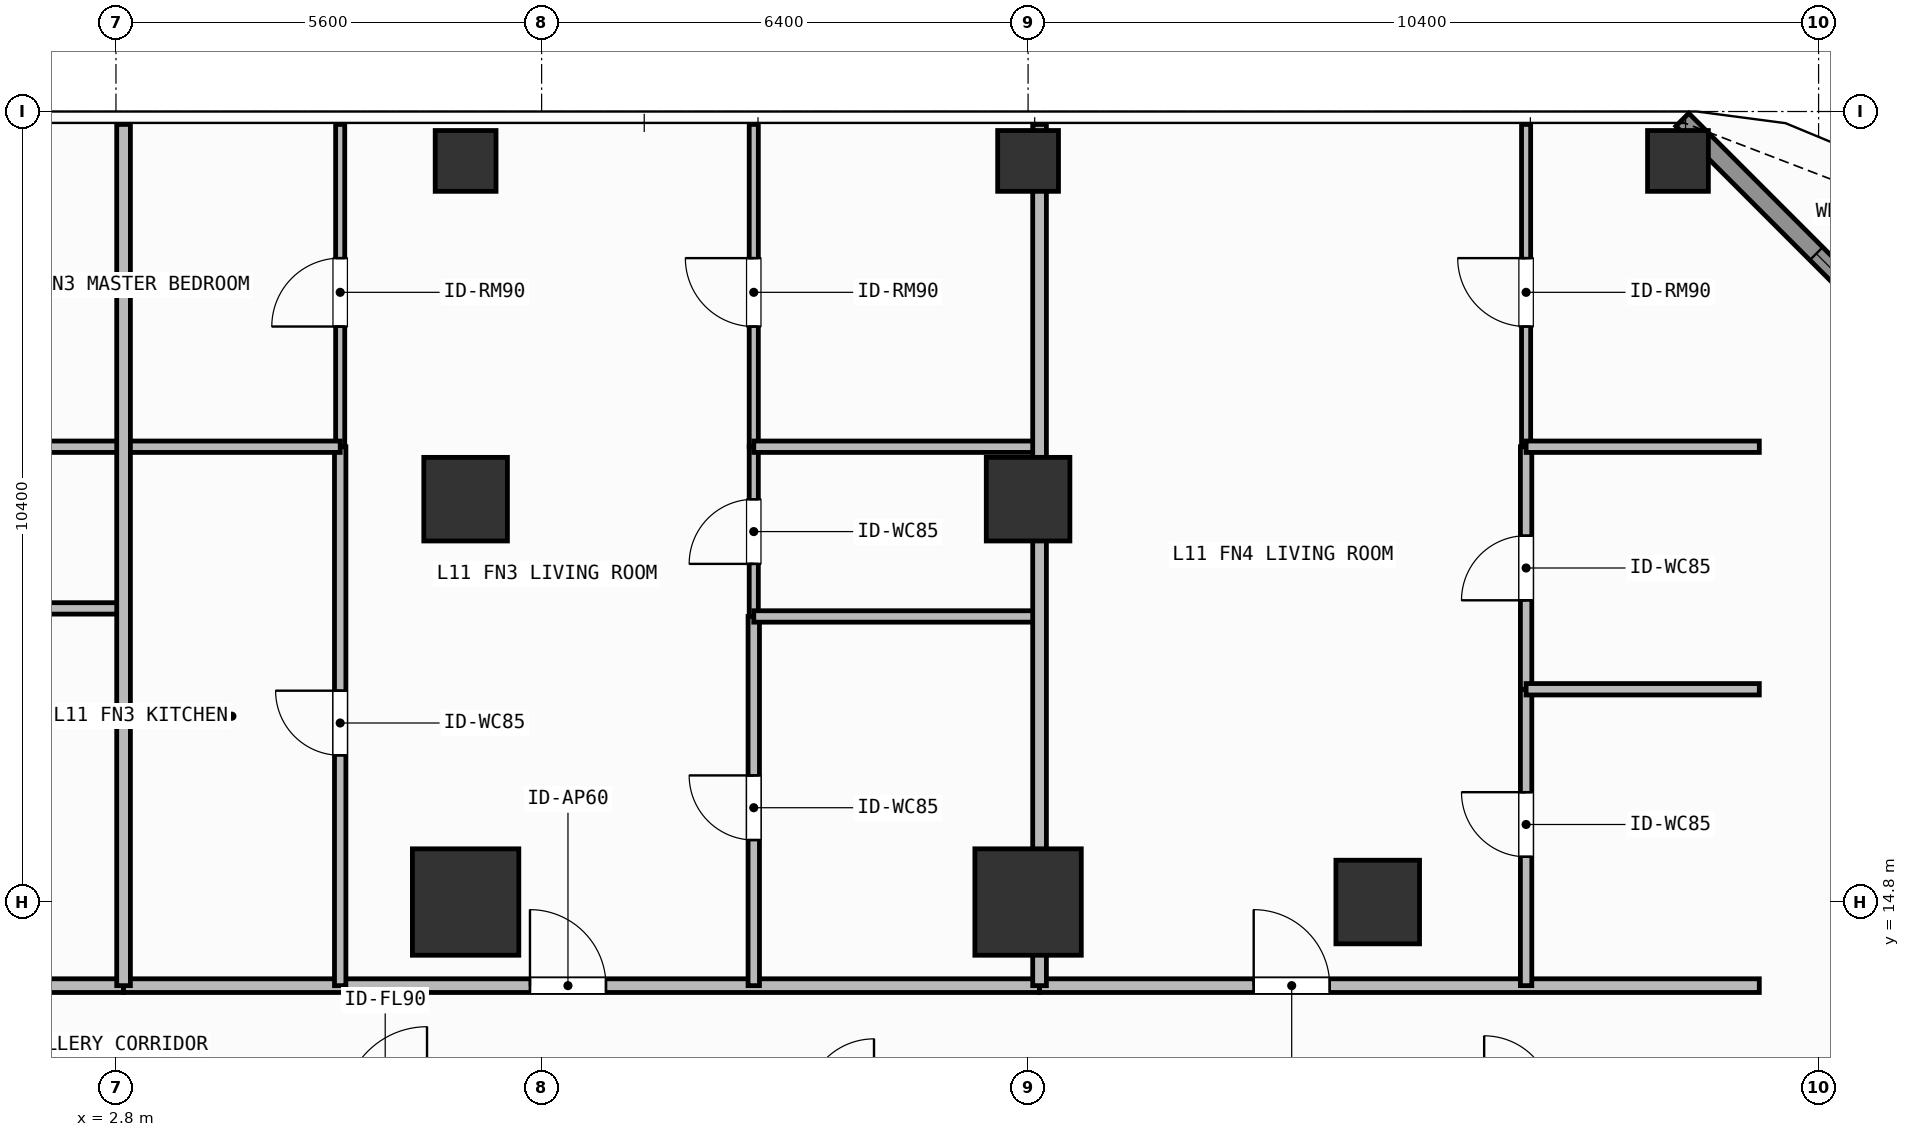
"""IFC4 building model, lengths in metres.
Left out: names, types, materials, properties, quantities, classifications, styles, units other than length and angle.
Written with IfcOpenShell. Run it as: python <this file> out.ifc"""

import sys

from ifc_helpers import new_model, si_unit, direction, frame, frame_2d, origin, origin_2d, place, context, subcontext, project, spatial, rectangle, hollow_rectangle, extrude, element, fill, save


model = new_model("IFC4")
c1 = context("Model", 3, precision=1e-05, world=origin(), true_north=direction((0.0, 1.0)))
c2 = subcontext(c1, "Body", "Model", "MODEL_VIEW")
j1 = project(units=[si_unit("LENGTHUNIT", "METRE"), si_unit("PLANEANGLEUNIT", "RADIAN")], contexts=[c1])
p1 = place(None, origin())
s1 = spatial("IfcSite", under=j1, at=p1, CompositionType="ELEMENT")
p2 = place(p1, origin())
s2 = spatial("IfcBuilding", under=s1, at=p2, CompositionType="ELEMENT")
p3 = place(p2, frame((0.0, 0.0, 42.3)))
s3 = spatial("IfcBuildingStorey", under=s2, at=p3, CompositionType="ELEMENT", Elevation=42.3)
for number, where, z_axis, x_axis in (
    (1, (7.4, 14.8, 0.0), (0.0, 0.0, 1.0), (1.0, 0.0, 0.0)),
    (2, (14.8, 14.8, 0.0), (0.0, 0.0, 1.0), (1.0, 0.0, 0.0)),
):
    element("IfcColumn", number, at=place(p3, frame(where, z_axis=z_axis, x_axis=x_axis)), inside=s3, PredefinedType="COLUMN", context=c2, shape_type="SweptSolid", body=[
        extrude(rectangle(XDim=1.4, YDim=1.4, at=origin_2d()), origin(), (0.0, 0.0, 1.0), 3.9),
    ])
for number, where, z_axis, x_axis in (
    (3, (19.4, 14.8, 0.0), (0.0, 0.0, 1.0), (1.0, 0.0, 0.0)),
    (4, (7.4, 20.1, 0.0), (0.0, 0.0, 1.0), (1.0, 0.0, 0.0)),
    (5, (14.8, 20.1, 0.0), (0.0, 0.0, 1.0), (1.0, 0.0, 0.0)),
):
    element("IfcColumn", number, at=place(p3, frame(where, z_axis=z_axis, x_axis=x_axis)), inside=s3, PredefinedType="COLUMN", context=c2, shape_type="SweptSolid", body=[
        extrude(rectangle(XDim=1.1, YDim=1.1, at=origin_2d()), origin(), (0.0, 0.0, 1.0), 3.9),
    ])
for number, where, z_axis, x_axis in (
    (6, (23.35, 24.55, 0.0), (0.0, 0.0, 1.0), (1.0, 0.0, 0.0)),
    (7, (7.4, 24.55, 0.0), (0.0, 0.0, 1.0), (1.0, 0.0, 0.0)),
    (8, (14.8, 24.55, 0.0), (0.0, 0.0, 1.0), (1.0, 0.0, 0.0)),
):
    element("IfcColumn", number, at=place(p3, frame(where, z_axis=z_axis, x_axis=x_axis)), inside=s3, PredefinedType="COLUMN", context=c2, shape_type="SweptSolid", body=[
        extrude(hollow_rectangle(XDim=0.8, YDim=0.8, WallThickness=0.036, at=origin_2d()), origin(), (0.0, 0.0, 1.0), 3.9),
    ])
p4 = place(p3, frame((23.408, 25.092, 0.0), z_axis=(0.0, 0.0, 1.0), x_axis=(0.707106781187, -0.707106781187, 0.0)))
e9 = element("IfcWall", 9, at=p4, inside=s3, PredefinedType="SOLIDWALL", context=c2, shape_type="SweptSolid", body=[
    extrude(rectangle(XDim=6.484, YDim=0.24, at=frame_2d((3.242, 0.0))), origin(), (0.0, 0.0, 1.0), 3.68),
])
p5 = place(p4, frame((2.492, 0.0, 0.8)))
e10 = element("IfcOpeningElement", 10, at=p5, cuts=e9, PredefinedType="OPENING", context=c2, shape_type="SweptSolid", body=[
    extrude(rectangle(XDim=1.5, YDim=1.85, at=frame_2d((0.75, 0.925))), frame((0.0, 0.13, 0.0), z_axis=(0.0, -1.0, 0.0), x_axis=(1.0, 0.0, 0.0)), (0.0, 0.0, 1.0), 0.26),
])
p6 = place(p3, frame((-9.151, 13.7, 0.0), z_axis=(0.0, 0.0, 1.0), x_axis=(1.0, 0.0, 0.0)))
e11 = element("IfcWall", 11, at=p6, inside=s3, PredefinedType="PARTITIONING", context=c2, shape_type="SweptSolid", body=[
    extrude(rectangle(XDim=12.051, YDim=0.18, at=frame_2d((6.025, 0.0))), origin(), (0.0, 0.0, 1.0), 3.68),
])
p7 = place(p6, frame((4.989, 0.0, 0.0)))
e12 = element("IfcOpeningElement", 12, at=p7, cuts=e11, PredefinedType="OPENING", context=c2, shape_type="SweptSolid", body=[
    extrude(rectangle(XDim=1.0, YDim=2.2, at=frame_2d((0.5, 1.1))), frame((0.0, 0.1, 0.0), z_axis=(0.0, -1.0, 0.0), x_axis=(1.0, 0.0, 0.0)), (0.0, 0.0, 1.0), 0.2),
])
p8 = place(p3, frame((2.9, 13.7, 0.0), z_axis=(0.0, 0.0, 1.0), x_axis=(1.0, 0.0, 0.0)))
e13 = element("IfcWall", 13, at=p8, inside=s3, PredefinedType="PARTITIONING", context=c2, shape_type="SweptSolid", body=[
    extrude(rectangle(XDim=12.051, YDim=0.18, at=frame_2d((6.025, 0.0))), origin(), (0.0, 0.0, 1.0), 3.68),
])
p9 = place(p8, frame((5.347, 0.0, 0.0)))
e14 = element("IfcOpeningElement", 14, at=p9, cuts=e13, PredefinedType="OPENING", context=c2, shape_type="SweptSolid", body=[
    extrude(rectangle(XDim=1.0, YDim=2.2, at=frame_2d((0.5, 1.1))), frame((0.0, 0.1, 0.0), z_axis=(0.0, -1.0, 0.0), x_axis=(1.0, 0.0, 0.0)), (0.0, 0.0, 1.0), 0.2),
])
p10 = place(p3, frame((5.75, 13.7, 0.0), z_axis=(0.0, 0.0, 1.0), x_axis=(0.0, 1.0, 0.0)))
e15 = element("IfcWall", 15, at=p10, inside=s3, PredefinedType="PARTITIONING", context=c2, shape_type="SweptSolid", body=[
    extrude(rectangle(XDim=7.09, YDim=0.15, at=frame_2d((3.545, 0.0))), origin(), (0.0, 0.0, 1.0), 3.68),
])
p11 = place(p10, frame((3.03, 0.0, 0.0)))
e16 = element("IfcOpeningElement", 16, at=p11, cuts=e15, PredefinedType="OPENING", context=c2, shape_type="SweptSolid", body=[
    extrude(rectangle(XDim=0.85, YDim=2.1, at=frame_2d((0.425, 1.05))), frame((0.0, 0.085, 0.0), z_axis=(0.0, -1.0, 0.0), x_axis=(1.0, 0.0, 0.0)), (0.0, 0.0, 1.0), 0.17),
])
p12 = place(p3, frame((5.75, 20.79, 0.0), z_axis=(0.0, 0.0, 1.0), x_axis=(0.0, 1.0, 0.0)))
e17 = element("IfcWall", 17, at=p12, inside=s3, PredefinedType="PARTITIONING", context=c2, shape_type="SweptSolid", body=[
    extrude(rectangle(XDim=4.24, YDim=0.12, at=frame_2d((2.12, 0.0))), origin(), (0.0, 0.0, 1.0), 3.68),
])
p13 = place(p12, frame((1.581, 0.0, 0.0)))
e18 = element("IfcOpeningElement", 18, at=p13, cuts=e17, PredefinedType="OPENING", context=c2, shape_type="SweptSolid", body=[
    extrude(rectangle(XDim=0.9, YDim=2.1, at=frame_2d((0.45, 1.05))), frame((0.0, 0.07, 0.0), z_axis=(0.0, -1.0, 0.0), x_axis=(1.0, 0.0, 0.0)), (0.0, 0.0, 1.0), 0.14),
])
p14 = place(p3, frame((11.191, 13.7, 0.0), z_axis=(0.0, 0.0, 1.0), x_axis=(0.0, 1.0, 0.0)))
e19 = element("IfcWall", 19, at=p14, inside=s3, PredefinedType="PARTITIONING", context=c2, shape_type="SweptSolid", body=[
    extrude(rectangle(XDim=4.857, YDim=0.15, at=frame_2d((2.428, 0.0))), origin(), (0.0, 0.0, 1.0), 3.68),
])
p15 = place(p14, frame((1.916, 0.0, 0.0)))
e20 = element("IfcOpeningElement", 20, at=p15, cuts=e19, PredefinedType="OPENING", context=c2, shape_type="SweptSolid", body=[
    extrude(rectangle(XDim=0.85, YDim=2.1, at=frame_2d((0.425, 1.05))), frame((0.0, 0.085, 0.0), z_axis=(0.0, -1.0, 0.0), x_axis=(1.0, 0.0, 0.0)), (0.0, 0.0, 1.0), 0.17),
])
p16 = place(p3, frame((11.191, 18.557, 0.0), z_axis=(0.0, 0.0, 1.0), x_axis=(0.0, 1.0, 0.0)))
e21 = element("IfcWall", 21, at=p16, inside=s3, PredefinedType="PARTITIONING", context=c2, shape_type="SweptSolid", body=[
    extrude(rectangle(XDim=2.233, YDim=0.12, at=frame_2d((1.117, 0.0))), origin(), (0.0, 0.0, 1.0), 3.37),
])
p17 = place(p16, frame((0.691, 0.0, 0.0)))
e22 = element("IfcOpeningElement", 22, at=p17, cuts=e21, PredefinedType="OPENING", context=c2, shape_type="SweptSolid", body=[
    extrude(rectangle(XDim=0.85, YDim=2.1, at=frame_2d((0.425, 1.05))), frame((0.0, 0.07, 0.0), z_axis=(0.0, -1.0, 0.0), x_axis=(1.0, 0.0, 0.0)), (0.0, 0.0, 1.0), 0.14),
])
p18 = place(p3, frame((11.191, 20.79, 0.0), z_axis=(0.0, 0.0, 1.0), x_axis=(0.0, 1.0, 0.0)))
e23 = element("IfcWall", 23, at=p18, inside=s3, PredefinedType="PARTITIONING", context=c2, shape_type="SweptSolid", body=[
    extrude(rectangle(XDim=4.24, YDim=0.12, at=frame_2d((2.12, 0.0))), origin(), (0.0, 0.0, 1.0), 3.37),
])
p19 = place(p18, frame((1.581, 0.0, 0.0)))
e24 = element("IfcOpeningElement", 24, at=p19, cuts=e23, PredefinedType="OPENING", context=c2, shape_type="SweptSolid", body=[
    extrude(rectangle(XDim=0.9, YDim=2.1, at=frame_2d((0.45, 1.05))), frame((0.0, 0.07, 0.0), z_axis=(0.0, -1.0, 0.0), x_axis=(1.0, 0.0, 0.0)), (0.0, 0.0, 1.0), 0.14),
])
p20 = place(p3, frame((14.951, 13.7, 0.0), z_axis=(0.0, 0.0, 1.0), x_axis=(1.0, 0.0, 0.0)))
e25 = element("IfcWall", 25, at=p20, inside=s3, PredefinedType="PARTITIONING", context=c2, shape_type="SweptSolid", body=[
    extrude(rectangle(XDim=9.469, YDim=0.18, at=frame_2d((4.734, 0.0))), origin(), (0.0, 0.0, 1.0), 3.68),
])
p21 = place(p20, frame((2.817, 0.0, 0.0)))
e26 = element("IfcOpeningElement", 26, at=p21, cuts=e25, PredefinedType="OPENING", context=c2, shape_type="SweptSolid", body=[
    extrude(rectangle(XDim=1.0, YDim=2.2, at=frame_2d((0.5, 1.1))), frame((0.0, 0.1, 0.0), z_axis=(0.0, -1.0, 0.0), x_axis=(1.0, 0.0, 0.0)), (0.0, 0.0, 1.0), 0.2),
])
p22 = place(p3, frame((21.352, 13.7, 0.0), z_axis=(0.0, 0.0, 1.0), x_axis=(0.0, 1.0, 0.0)))
e27 = element("IfcWall", 27, at=p22, inside=s3, PredefinedType="PARTITIONING", context=c2, shape_type="SweptSolid", body=[
    extrude(rectangle(XDim=3.899, YDim=0.15, at=frame_2d((1.95, 0.0))), origin(), (0.0, 0.0, 1.0), 3.68),
])
p23 = place(p22, frame((1.695, 0.0, 0.0)))
e28 = element("IfcOpeningElement", 28, at=p23, cuts=e27, PredefinedType="OPENING", context=c2, shape_type="SweptSolid", body=[
    extrude(rectangle(XDim=0.85, YDim=2.1, at=frame_2d((0.425, 1.05))), frame((0.0, 0.085, 0.0), z_axis=(0.0, -1.0, 0.0), x_axis=(1.0, 0.0, 0.0)), (0.0, 0.0, 1.0), 0.17),
])
p24 = place(p3, frame((21.352, 17.599, 0.0), z_axis=(0.0, 0.0, 1.0), x_axis=(0.0, 1.0, 0.0)))
e29 = element("IfcWall", 29, at=p24, inside=s3, PredefinedType="PARTITIONING", context=c2, shape_type="SweptSolid", body=[
    extrude(rectangle(XDim=3.191, YDim=0.15, at=frame_2d((1.595, 0.0))), origin(), (0.0, 0.0, 1.0), 3.68),
])
p25 = place(p24, frame((1.17, 0.0, 0.0)))
e30 = element("IfcOpeningElement", 30, at=p25, cuts=e29, PredefinedType="OPENING", context=c2, shape_type="SweptSolid", body=[
    extrude(rectangle(XDim=0.85, YDim=2.1, at=frame_2d((0.425, 1.05))), frame((0.0, 0.085, 0.0), z_axis=(0.0, -1.0, 0.0), x_axis=(1.0, 0.0, 0.0)), (0.0, 0.0, 1.0), 0.17),
])
p26 = place(p3, frame((21.352, 20.79, 0.0), z_axis=(0.0, 0.0, 1.0), x_axis=(0.0, 1.0, 0.0)))
e31 = element("IfcWall", 31, at=p26, inside=s3, PredefinedType="PARTITIONING", context=c2, shape_type="SweptSolid", body=[
    extrude(rectangle(XDim=4.24, YDim=0.12, at=frame_2d((2.12, 0.0))), origin(), (0.0, 0.0, 1.0), 3.68),
])
p27 = place(p26, frame((1.581, 0.0, 0.0)))
e32 = element("IfcOpeningElement", 32, at=p27, cuts=e31, PredefinedType="OPENING", context=c2, shape_type="SweptSolid", body=[
    extrude(rectangle(XDim=0.9, YDim=2.1, at=frame_2d((0.45, 1.05))), frame((0.0, 0.07, 0.0), z_axis=(0.0, -1.0, 0.0), x_axis=(1.0, 0.0, 0.0)), (0.0, 0.0, 1.0), 0.14),
])
for number, where, z_axis, x_axis in (
    (33, (-1.92, 18.663, 0.0), (0.0, 0.0, 1.0), (1.0, 0.0, 0.0)),
    (34, (-1.92, 20.79, 0.0), (0.0, 0.0, 1.0), (1.0, 0.0, 0.0)),
):
    element("IfcWall", number, at=place(p3, frame(where, z_axis=z_axis, x_axis=x_axis)), inside=s3, PredefinedType="PARTITIONING", context=c2, shape_type="SweptSolid", body=[
        extrude(rectangle(XDim=4.82, YDim=0.15, at=frame_2d((2.41, 0.0))), origin(), (0.0, 0.0, 1.0), 3.68),
    ])
p28 = place(p3, frame((2.9, 20.79, 0.0), z_axis=(0.0, 0.0, 1.0), x_axis=(1.0, 0.0, 0.0)))
e35 = element("IfcWall", 35, at=p28, inside=s3, PredefinedType="PARTITIONING", context=c2, shape_type="SweptSolid", body=[
    extrude(rectangle(XDim=2.85, YDim=0.15, at=frame_2d((1.425, 0.0))), origin(), (0.0, 0.0, 1.0), 3.68),
])
for number, where, z_axis, x_axis in (
    (36, (11.191, 18.557, 0.0), (0.0, 0.0, 1.0), (1.0, 0.0, 0.0)),
    (37, (11.191, 20.79, 0.0), (0.0, 0.0, 1.0), (1.0, 0.0, 0.0)),
):
    element("IfcWall", number, at=place(p3, frame(where, z_axis=z_axis, x_axis=x_axis)), inside=s3, PredefinedType="PARTITIONING", context=c2, shape_type="SweptSolid", body=[
        extrude(rectangle(XDim=3.76, YDim=0.15, at=frame_2d((1.88, 0.0))), origin(), (0.0, 0.0, 1.0), 3.68),
    ])
p29 = place(p3, frame((2.9, 13.7, 0.0), z_axis=(0.0, 0.0, 1.0), x_axis=(0.0, 1.0, 0.0)))
e38 = element("IfcWall", 38, at=p29, inside=s3, PredefinedType="PARTITIONING", context=c2, shape_type="SweptSolid", body=[
    extrude(rectangle(XDim=11.33, YDim=0.18, at=frame_2d((5.665, 0.0))), origin(), (0.0, 0.0, 1.0), 3.68),
])
for number, where, z_axis, x_axis in (
    (39, (21.352, 17.599, 0.0), (0.0, 0.0, 1.0), (1.0, 0.0, 0.0)),
    (40, (21.352, 20.79, 0.0), (0.0, 0.0, 1.0), (1.0, 0.0, 0.0)),
):
    element("IfcWall", number, at=place(p3, frame(where, z_axis=z_axis, x_axis=x_axis)), inside=s3, PredefinedType="PARTITIONING", context=c2, shape_type="SweptSolid", body=[
        extrude(rectangle(XDim=3.068, YDim=0.15, at=frame_2d((1.534, 0.0))), origin(), (0.0, 0.0, 1.0), 3.68),
    ])
p30 = place(p3, frame((14.951, 13.7, 0.0), z_axis=(0.0, 0.0, 1.0), x_axis=(0.0, 1.0, 0.0)))
e41 = element("IfcWall", 41, at=p30, inside=s3, PredefinedType="PARTITIONING", context=c2, shape_type="SweptSolid", body=[
    extrude(rectangle(XDim=11.33, YDim=0.18, at=frame_2d((5.665, 0.0))), origin(), (0.0, 0.0, 1.0), 3.082),
])
p31 = place(p5, origin())
e42 = element("IfcWindow", 42, at=p31, inside=s3, PartitioningType="SINGLE_PANEL", PredefinedType="WINDOW", context=c2, shape_type="SweptSolid", body=[
    extrude(rectangle(XDim=1.5, YDim=1.85, at=frame_2d((0.75, 0.925))), frame((0.0, 0.03, 0.0), z_axis=(0.0, -1.0, 0.0), x_axis=(1.0, 0.0, 0.0)), (0.0, 0.0, 1.0), 0.06),
])
fill(e10, e42)
p32 = place(p9, origin())
e43 = element("IfcDoor", 43, at=p32, inside=s3, OperationType="SINGLE_SWING_LEFT", PredefinedType="DOOR", context=c2, shape_type="SweptSolid", body=[
    extrude(rectangle(XDim=1.0, YDim=2.2, at=frame_2d((0.5, 1.1))), frame((0.0, 0.025, 0.0), z_axis=(0.0, -1.0, 0.0), x_axis=(1.0, 0.0, 0.0)), (0.0, 0.0, 1.0), 0.05),
])
fill(e14, e43)
p33 = place(p11, origin())
e44 = element("IfcDoor", 44, at=p33, inside=s3, OperationType="SINGLE_SWING_RIGHT", PredefinedType="DOOR", context=c2, shape_type="SweptSolid", body=[
    extrude(rectangle(XDim=0.85, YDim=2.1, at=frame_2d((0.425, 1.05))), frame((0.0, 0.025, 0.0), z_axis=(0.0, -1.0, 0.0), x_axis=(1.0, 0.0, 0.0)), (0.0, 0.0, 1.0), 0.05),
])
fill(e16, e44)
p34 = place(p13, origin())
e45 = element("IfcDoor", 45, at=p34, inside=s3, OperationType="SINGLE_SWING_LEFT", PredefinedType="DOOR", context=c2, shape_type="SweptSolid", body=[
    extrude(rectangle(XDim=0.9, YDim=2.1, at=frame_2d((0.45, 1.05))), frame((0.0, 0.025, 0.0), z_axis=(0.0, -1.0, 0.0), x_axis=(1.0, 0.0, 0.0)), (0.0, 0.0, 1.0), 0.05),
])
fill(e18, e45)
p35 = place(p15, origin())
e46 = element("IfcDoor", 46, at=p35, inside=s3, OperationType="SINGLE_SWING_RIGHT", PredefinedType="DOOR", context=c2, shape_type="SweptSolid", body=[
    extrude(rectangle(XDim=0.85, YDim=2.1, at=frame_2d((0.425, 1.05))), frame((0.0, 0.025, 0.0), z_axis=(0.0, -1.0, 0.0), x_axis=(1.0, 0.0, 0.0)), (0.0, 0.0, 1.0), 0.05),
])
fill(e20, e46)
p36 = place(p17, origin())
e47 = element("IfcDoor", 47, at=p36, inside=s3, OperationType="SINGLE_SWING_LEFT", PredefinedType="DOOR", context=c2, shape_type="SweptSolid", body=[
    extrude(rectangle(XDim=0.85, YDim=2.1, at=frame_2d((0.425, 1.05))), frame((0.0, 0.025, 0.0), z_axis=(0.0, -1.0, 0.0), x_axis=(1.0, 0.0, 0.0)), (0.0, 0.0, 1.0), 0.05),
])
fill(e22, e47)
p37 = place(p19, origin())
e48 = element("IfcDoor", 48, at=p37, inside=s3, OperationType="SINGLE_SWING_RIGHT", PredefinedType="DOOR", context=c2, shape_type="SweptSolid", body=[
    extrude(rectangle(XDim=0.9, YDim=2.1, at=frame_2d((0.45, 1.05))), frame((0.0, 0.025, 0.0), z_axis=(0.0, -1.0, 0.0), x_axis=(1.0, 0.0, 0.0)), (0.0, 0.0, 1.0), 0.05),
])
fill(e24, e48)
p38 = place(p21, origin())
e49 = element("IfcDoor", 49, at=p38, inside=s3, OperationType="SINGLE_SWING_LEFT", PredefinedType="DOOR", context=c2, shape_type="SweptSolid", body=[
    extrude(rectangle(XDim=1.0, YDim=2.2, at=frame_2d((0.5, 1.1))), frame((0.0, 0.025, 0.0), z_axis=(0.0, -1.0, 0.0), x_axis=(1.0, 0.0, 0.0)), (0.0, 0.0, 1.0), 0.05),
])
fill(e26, e49)
p39 = place(p23, origin())
e50 = element("IfcDoor", 50, at=p39, inside=s3, OperationType="SINGLE_SWING_RIGHT", PredefinedType="DOOR", context=c2, shape_type="SweptSolid", body=[
    extrude(rectangle(XDim=0.85, YDim=2.1, at=frame_2d((0.425, 1.05))), frame((0.0, 0.025, 0.0), z_axis=(0.0, -1.0, 0.0), x_axis=(1.0, 0.0, 0.0)), (0.0, 0.0, 1.0), 0.05),
])
fill(e28, e50)
p40 = place(p25, origin())
e51 = element("IfcDoor", 51, at=p40, inside=s3, OperationType="SINGLE_SWING_LEFT", PredefinedType="DOOR", context=c2, shape_type="SweptSolid", body=[
    extrude(rectangle(XDim=0.85, YDim=2.1, at=frame_2d((0.425, 1.05))), frame((0.0, 0.025, 0.0), z_axis=(0.0, -1.0, 0.0), x_axis=(1.0, 0.0, 0.0)), (0.0, 0.0, 1.0), 0.05),
])
fill(e30, e51)
p41 = place(p27, origin())
e52 = element("IfcDoor", 52, at=p41, inside=s3, OperationType="SINGLE_SWING_RIGHT", PredefinedType="DOOR", context=c2, shape_type="SweptSolid", body=[
    extrude(rectangle(XDim=0.9, YDim=2.1, at=frame_2d((0.45, 1.05))), frame((0.0, 0.025, 0.0), z_axis=(0.0, -1.0, 0.0), x_axis=(1.0, 0.0, 0.0)), (0.0, 0.0, 1.0), 0.05),
])
fill(e32, e52)
save(model, sys.argv[1])
